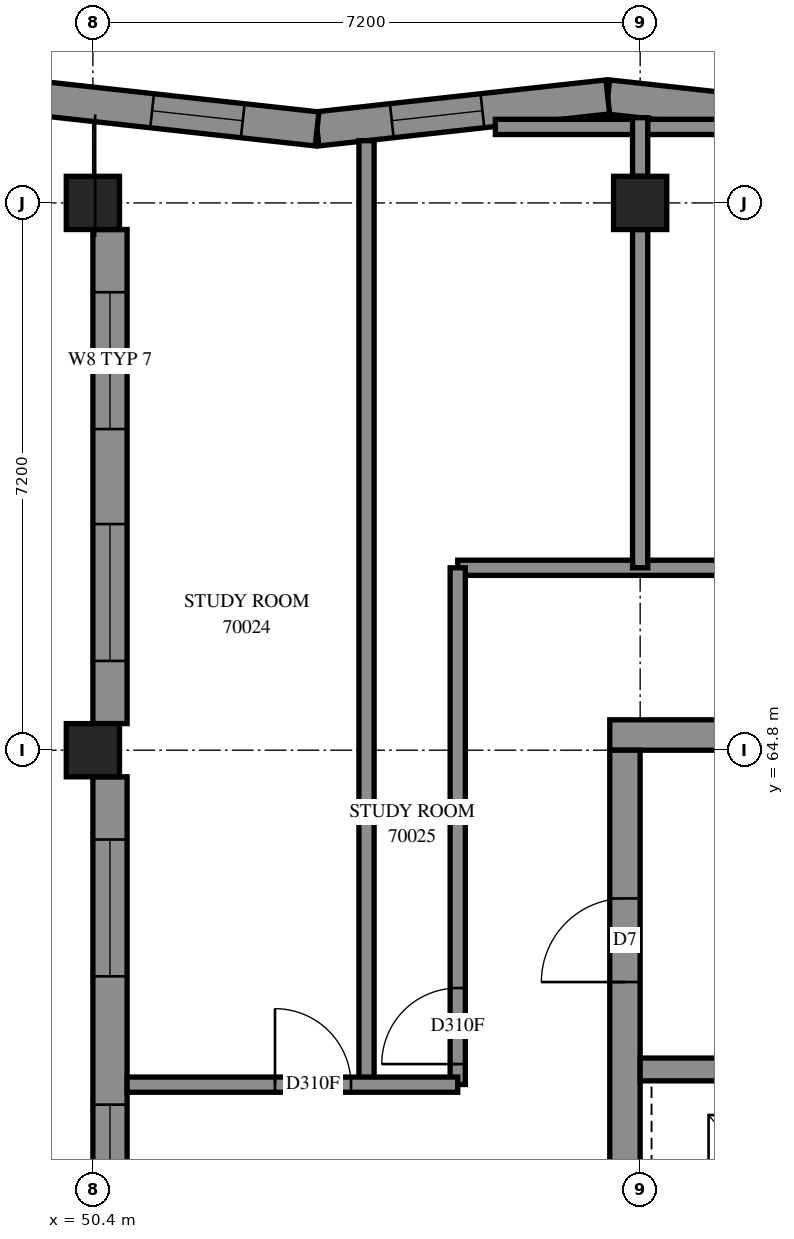
"""IFC4 building model, lengths in metres.
Left out: names, types, materials, properties, quantities, classifications, styles, units other than length and angle.
Written with IfcOpenShell. Run it as: python <this file> out.ifc"""

import sys

from ifc_helpers import new_model, si_unit, direction, frame, frame_2d, origin, origin_2d, place, context, subcontext, project, spatial, polyline, rectangle, outline, extrude, element, fill, save


model = new_model("IFC4")
c1 = context("Model", 3, precision=1e-05, world=origin(), true_north=direction((0.0, 1.0)))
c2 = subcontext(c1, "Body", "Model", "MODEL_VIEW")
j1 = project(units=[si_unit("LENGTHUNIT", "METRE"), si_unit("PLANEANGLEUNIT", "RADIAN")], contexts=[c1])
p1 = place(None, origin())
s1 = spatial("IfcSite", under=j1, at=p1, CompositionType="ELEMENT")
p2 = place(p1, origin())
s2 = spatial("IfcBuilding", under=s1, at=p2, CompositionType="ELEMENT")
p3 = place(p2, frame((0.0, 0.0, 257.4)))
s3 = spatial("IfcBuildingStorey", under=s2, at=p3, CompositionType="ELEMENT", Elevation=257.4)
for number, where, z_axis, x_axis in (
    (1, (50.4, 64.8, 0.0), (0.0, 0.0, 1.0), (1.0, 0.0, 0.0)),
    (2, (50.4, 72.0, 0.0), (0.0, 0.0, 1.0), (1.0, 0.0, 0.0)),
    (3, (57.6, 72.0, 0.0), (0.0, 0.0, 1.0), (1.0, 0.0, 0.0)),
):
    element("IfcColumn", number, at=place(p3, frame(where, z_axis=z_axis, x_axis=x_axis)), inside=s3, PredefinedType="COLUMN", context=c2, shape_type="SweptSolid", body=[
        extrude(rectangle(XDim=0.7, YDim=0.7, at=origin_2d()), origin(), (0.0, 0.0, 1.0), 3.1),
    ])
p4 = place(p3, frame((57.2, 65.0, -0.3), z_axis=(0.0, 0.0, 1.0), x_axis=(1.0, 0.0, 0.0)))
e4 = element("IfcWall", 4, at=p4, inside=s3, PredefinedType="SHEAR", context=c2, shape_type="SweptSolid", body=[
    extrude(rectangle(XDim=15.2, YDim=0.4, at=frame_2d((7.6, 0.0))), origin(), (0.0, 0.0, 1.0), 2.7),
])
p5 = place(p4, frame((10.4, 0.0, 0.3)))
e5 = element("IfcOpeningElement", 5, at=p5, cuts=e4, PredefinedType="OPENING", context=c2, shape_type="SweptSolid", body=[
    extrude(rectangle(XDim=0.8, YDim=2.1, at=frame_2d((0.4, 1.05))), frame((0.0, 0.21, 0.0), z_axis=(0.0, -1.0, 0.0), x_axis=(1.0, 0.0, 0.0)), (0.0, 0.0, 1.0), 0.42),
])
p6 = place(p3, frame((57.4, 50.4, -0.3), z_axis=(0.0, 0.0, 1.0), x_axis=(0.0, 1.0, 0.0)))
e6 = element("IfcWall", 6, at=p6, inside=s3, PredefinedType="SHEAR", context=c2, shape_type="SweptSolid", body=[
    extrude(rectangle(XDim=14.4, YDim=0.4, at=frame_2d((7.2, 0.0))), origin(), (0.0, 0.0, 1.0), 2.7),
])
p7 = place(p6, frame((4.55, 0.0, 0.3)))
e7 = element("IfcOpeningElement", 7, at=p7, cuts=e6, PredefinedType="OPENING", context=c2, shape_type="SweptSolid", body=[
    extrude(rectangle(XDim=1.1, YDim=2.1, at=frame_2d((0.55, 1.05))), frame((0.0, 0.21, 0.0), z_axis=(0.0, -1.0, 0.0), x_axis=(1.0, 0.0, 0.0)), (0.0, 0.0, 1.0), 0.42),
])
p8 = place(p6, frame((11.35, 0.0, 0.3)))
e8 = element("IfcOpeningElement", 8, at=p8, cuts=e6, PredefinedType="OPENING", context=c2, shape_type="SweptSolid", body=[
    extrude(rectangle(XDim=1.1, YDim=2.1, at=frame_2d((0.55, 1.05))), frame((0.0, 0.21, 0.0), z_axis=(0.0, -1.0, 0.0), x_axis=(1.0, 0.0, 0.0)), (0.0, 0.0, 1.0), 0.42),
])
p9 = place(p3, frame((57.6, 60.6, 0.0), z_axis=(0.0, 0.0, 1.0), x_axis=(1.0, 0.0, 0.0)))
e9 = element("IfcWall", 9, at=p9, inside=s3, PredefinedType="SOLIDWALL", context=c2, shape_type="SweptSolid", body=[
    extrude(rectangle(XDim=7.2, YDim=0.3, at=frame_2d((3.6, 0.0))), origin(), (0.0, 0.0, 1.0), 3.1),
])
p10 = place(p3, frame((60.998, 72.974, 0.0), z_axis=(0.0, 0.0, 1.0), x_axis=(-0.993995115, 0.109424455, 0.0)))
e10 = element("IfcWall", 10, at=p10, inside=s3, PredefinedType="SOLIDWALL", context=c2, shape_type="SweptSolid", body=[
    extrude(outline(polyline([(0.025, -0.225), (3.872, -0.225), (3.823, 0.225), (-0.025, 0.225), (0.025, -0.225)])), origin(), (0.0, 0.0, 1.0), 3.1),
])
p11 = place(p10, frame((0.422, 0.0, 0.7)))
e11 = element("IfcOpeningElement", 11, at=p11, cuts=e10, PredefinedType="OPENING", context=c2, shape_type="SweptSolid", body=[
    extrude(rectangle(XDim=1.8, YDim=2.3, at=frame_2d((0.9, 1.15))), frame((0.0, 0.235, 0.0), z_axis=(0.0, -1.0, 0.0), x_axis=(1.0, 0.0, 0.0)), (0.0, 0.0, 1.0), 0.47),
])
p12 = place(p3, frame((57.174, 73.395, 0.0), z_axis=(0.0, 0.0, 1.0), x_axis=(-0.9939954262, -0.1094216281, 0.0)))
e12 = element("IfcWall", 12, at=p12, inside=s3, PredefinedType="SOLIDWALL", context=c2, shape_type="SweptSolid", body=[
    extrude(outline(polyline([(-0.025, -0.225), (3.823, -0.225), (3.872, 0.225), (0.025, 0.225), (-0.025, -0.225)])), origin(), (0.0, 0.0, 1.0), 3.1),
])
p13 = place(p12, frame((1.659, 0.0, 0.45)))
e13 = element("IfcOpeningElement", 13, at=p13, cuts=e12, PredefinedType="OPENING", context=c2, shape_type="SweptSolid", body=[
    extrude(rectangle(XDim=1.2, YDim=2.55, at=frame_2d((0.6, 1.275))), frame((0.0, 0.235, 0.0), z_axis=(0.0, -1.0, 0.0), x_axis=(1.0, 0.0, 0.0)), (0.0, 0.0, 1.0), 0.47),
])
p14 = place(p3, frame((53.349, 72.974, 0.0), z_axis=(0.0, 0.0, 1.0), x_axis=(-0.9939954262, 0.1094216281, 0.0)))
e14 = element("IfcWall", 14, at=p14, inside=s3, PredefinedType="SOLIDWALL", context=c2, shape_type="SweptSolid", body=[
    extrude(outline(polyline([(0.025, -0.225), (3.872, -0.225), (3.823, 0.225), (-0.025, 0.225), (0.025, -0.225)])), origin(), (0.0, 0.0, 1.0), 3.1),
])
p15 = place(p14, frame((0.984, 0.0, 0.45)))
e15 = element("IfcOpeningElement", 15, at=p15, cuts=e14, PredefinedType="OPENING", context=c2, shape_type="SweptSolid", body=[
    extrude(rectangle(XDim=1.2, YDim=2.55, at=frame_2d((0.6, 1.275))), frame((0.0, 0.235, 0.0), z_axis=(0.0, -1.0, 0.0), x_axis=(1.0, 0.0, 0.0)), (0.0, 0.0, 1.0), 0.47),
])
p16 = place(p3, frame((50.625, 71.65, 0.0), z_axis=(0.0, 0.0, 1.0), x_axis=(0.0, -1.0, 0.0)))
e16 = element("IfcWall", 16, at=p16, inside=s3, PredefinedType="SOLIDWALL", context=c2, shape_type="SweptSolid", body=[
    extrude(rectangle(XDim=6.5, YDim=0.45, at=frame_2d((3.25, 0.0))), origin(), (0.0, 0.0, 1.0), 3.1),
])
p17 = place(p16, frame((0.825, 0.0, 0.7)))
e17 = element("IfcOpeningElement", 17, at=p17, cuts=e16, PredefinedType="OPENING", context=c2, shape_type="SweptSolid", body=[
    extrude(rectangle(XDim=1.8, YDim=1.8, at=frame_2d((0.9, 0.9))), frame((0.0, 0.235, 0.0), z_axis=(0.0, -1.0, 0.0), x_axis=(1.0, 0.0, 0.0)), (0.0, 0.0, 1.0), 0.47),
])
p18 = place(p16, frame((3.875, 0.0, 0.7)))
e18 = element("IfcOpeningElement", 18, at=p18, cuts=e16, PredefinedType="OPENING", context=c2, shape_type="SweptSolid", body=[
    extrude(rectangle(XDim=1.8, YDim=1.8, at=frame_2d((0.9, 0.9))), frame((0.0, 0.235, 0.0), z_axis=(0.0, -1.0, 0.0), x_axis=(1.0, 0.0, 0.0)), (0.0, 0.0, 1.0), 0.47),
])
p19 = place(p3, frame((50.625, 64.45, 0.0), z_axis=(0.0, 0.0, 1.0), x_axis=(0.0, -1.0, 0.0)))
e19 = element("IfcWall", 19, at=p19, inside=s3, PredefinedType="SOLIDWALL", context=c2, shape_type="SweptSolid", body=[
    extrude(rectangle(XDim=6.5, YDim=0.45, at=frame_2d((3.25, 0.0))), origin(), (0.0, 0.0, 1.0), 3.1),
])
p20 = place(p19, frame((0.825, 0.0, 0.7)))
e20 = element("IfcOpeningElement", 20, at=p20, cuts=e19, PredefinedType="OPENING", context=c2, shape_type="SweptSolid", body=[
    extrude(rectangle(XDim=1.8, YDim=1.8, at=frame_2d((0.9, 0.9))), frame((0.0, 0.235, 0.0), z_axis=(0.0, -1.0, 0.0), x_axis=(1.0, 0.0, 0.0)), (0.0, 0.0, 1.0), 0.47),
])
p21 = place(p19, frame((4.312, 0.0, 0.6)))
e21 = element("IfcOpeningElement", 21, at=p21, cuts=e19, PredefinedType="OPENING", context=c2, shape_type="SweptSolid", body=[
    extrude(rectangle(XDim=1.2, YDim=1.9, at=frame_2d((0.6, 0.95))), frame((0.0, 0.235, 0.0), z_axis=(0.0, -1.0, 0.0), x_axis=(1.0, 0.0, 0.0)), (0.0, 0.0, 1.0), 0.47),
])
p22 = place(p3, frame((55.2, 67.2, 0.0), z_axis=(0.0, 0.0, 1.0), x_axis=(1.0, 0.0, 0.0)))
e22 = element("IfcWall", 22, at=p22, inside=s3, PredefinedType="PARTITIONING", context=c2, shape_type="SweptSolid", body=[
    extrude(rectangle(XDim=19.2, YDim=0.2, at=frame_2d((9.6, 0.0))), origin(), (0.0, 0.0, 1.0), 3.1),
])
p23 = place(p22, frame((4.475, 0.0, 0.0)))
e23 = element("IfcOpeningElement", 23, at=p23, cuts=e22, PredefinedType="OPENING", context=c2, shape_type="SweptSolid", body=[
    extrude(rectangle(XDim=1.0, YDim=2.1, at=frame_2d((0.5, 1.05))), frame((0.0, 0.11, 0.0), z_axis=(0.0, -1.0, 0.0), x_axis=(1.0, 0.0, 0.0)), (0.0, 0.0, 1.0), 0.22),
])
p24 = place(p22, frame((8.301, 0.0, 0.0)))
e24 = element("IfcOpeningElement", 24, at=p24, cuts=e22, PredefinedType="OPENING", context=c2, shape_type="SweptSolid", body=[
    extrude(rectangle(XDim=0.9, YDim=2.1, at=frame_2d((0.45, 1.05))), frame((0.0, 0.11, 0.0), z_axis=(0.0, -1.0, 0.0), x_axis=(1.0, 0.0, 0.0)), (0.0, 0.0, 1.0), 0.22),
])
p25 = place(p22, frame((13.88, 0.0, 0.0)))
e25 = element("IfcOpeningElement", 25, at=p25, cuts=e22, PredefinedType="OPENING", context=c2, shape_type="SweptSolid", body=[
    extrude(rectangle(XDim=1.0, YDim=2.1, at=frame_2d((0.5, 1.05))), frame((0.0, 0.11, 0.0), z_axis=(0.0, -1.0, 0.0), x_axis=(1.0, 0.0, 0.0)), (0.0, 0.0, 1.0), 0.22),
])
p26 = place(p3, frame((54.0, 60.4, 0.0), z_axis=(0.0, 0.0, 1.0), x_axis=(0.0, 1.0, 0.0)))
e26 = element("IfcWall", 26, at=p26, inside=s3, PredefinedType="PARTITIONING", context=c2, shape_type="SweptSolid", body=[
    extrude(rectangle(XDim=12.419, YDim=0.2, at=frame_2d((6.21, 0.0))), origin(), (0.0, 0.0, 1.0), 3.1),
])
p27 = place(p3, frame((55.2, 60.402, 0.0), z_axis=(0.0, 0.0, 1.0), x_axis=(0.0, 1.0, 0.0)))
e27 = element("IfcWall", 27, at=p27, inside=s3, PredefinedType="PARTITIONING", context=c2, shape_type="SweptSolid", body=[
    extrude(rectangle(XDim=6.798, YDim=0.2, at=frame_2d((3.399, 0.0))), origin(), (0.0, 0.0, 1.0), 3.1),
])
p28 = place(p27, frame((0.269, 0.0, 0.0)))
e28 = element("IfcOpeningElement", 28, at=p28, cuts=e27, PredefinedType="OPENING", context=c2, shape_type="SweptSolid", body=[
    extrude(rectangle(XDim=1.0, YDim=2.1, at=frame_2d((0.5, 1.05))), frame((0.0, 0.11, 0.0), z_axis=(0.0, -1.0, 0.0), x_axis=(1.0, 0.0, 0.0)), (0.0, 0.0, 1.0), 0.22),
])
p29 = place(p3, frame((57.6, 67.2, 0.0), z_axis=(0.0, 0.0, 1.0), x_axis=(0.0, 1.0, 0.0)))
e29 = element("IfcWall", 29, at=p29, inside=s3, PredefinedType="PARTITIONING", context=c2, shape_type="SweptSolid", body=[
    extrude(rectangle(XDim=4.45, YDim=0.2, at=frame_2d((2.225, 0.0))), origin(), (0.0, 0.0, 1.0), 3.1),
])
p30 = place(p3, frame((50.85, 60.4, 0.0), z_axis=(0.0, 0.0, 1.0), x_axis=(1.0, 0.0, 0.0)))
e30 = element("IfcWall", 30, at=p30, inside=s3, PredefinedType="PARTITIONING", context=c2, shape_type="SweptSolid", body=[
    extrude(rectangle(XDim=4.35, YDim=0.2, at=frame_2d((2.175, 0.0))), origin(), (0.0, 0.0, 1.0), 3.1),
])
p31 = place(p30, frame((1.946, 0.0, 0.0)))
e31 = element("IfcOpeningElement", 31, at=p31, cuts=e30, PredefinedType="OPENING", context=c2, shape_type="SweptSolid", body=[
    extrude(rectangle(XDim=1.0, YDim=2.1, at=frame_2d((0.5, 1.05))), frame((0.0, 0.11, 0.0), z_axis=(0.0, -1.0, 0.0), x_axis=(1.0, 0.0, 0.0)), (0.0, 0.0, 1.0), 0.22),
])
p32 = place(p3, frame((55.695, 73.0, 0.0), z_axis=(0.0, 0.0, 1.0), x_axis=(1.0, 0.0, 0.0)))
e32 = element("IfcWall", 32, at=p32, inside=s3, PredefinedType="PARTITIONING", context=c2, shape_type="SweptSolid", body=[
    extrude(rectangle(XDim=2.957, YDim=0.2, at=frame_2d((1.479, 0.0))), origin(), (0.0, 0.0, 1.0), 3.1),
])
p33 = place(p3, frame((57.6, 72.35, 0.0), z_axis=(0.0, 0.0, 1.0), x_axis=(0.0, 1.0, 0.0)))
e33 = element("IfcWall", 33, at=p33, inside=s3, PredefinedType="PARTITIONING", context=c2, shape_type="SweptSolid", body=[
    extrude(rectangle(XDim=0.771, YDim=0.2, at=frame_2d((0.386, 0.0))), origin(), (0.0, 0.0, 1.0), 3.1),
])
p34 = place(p13, origin())
e34 = element("IfcWindow", 34, at=p34, inside=s3, PartitioningType="SINGLE_PANEL", PredefinedType="WINDOW", context=c2, shape_type="SweptSolid", body=[
    extrude(rectangle(XDim=1.2, YDim=2.55, at=frame_2d((0.6, 1.275))), frame((0.0, 0.205, 0.0), z_axis=(0.0, -1.0, 0.0), x_axis=(1.0, 0.0, 0.0)), (0.0, 0.0, 1.0), 0.06),
])
fill(e13, e34)
p35 = place(p15, origin())
e35 = element("IfcWindow", 35, at=p35, inside=s3, PartitioningType="SINGLE_PANEL", PredefinedType="WINDOW", context=c2, shape_type="SweptSolid", body=[
    extrude(rectangle(XDim=1.2, YDim=2.55, at=frame_2d((0.6, 1.275))), frame((0.0, 0.205, 0.0), z_axis=(0.0, -1.0, 0.0), x_axis=(1.0, 0.0, 0.0)), (0.0, 0.0, 1.0), 0.06),
])
fill(e15, e35)
p36 = place(p17, origin())
e36 = element("IfcWindow", 36, at=p36, inside=s3, PartitioningType="SINGLE_PANEL", PredefinedType="WINDOW", context=c2, shape_type="SweptSolid", body=[
    extrude(rectangle(XDim=1.8, YDim=1.8, at=frame_2d((0.9, 0.9))), frame((0.0, 0.205, 0.0), z_axis=(0.0, -1.0, 0.0), x_axis=(1.0, 0.0, 0.0)), (0.0, 0.0, 1.0), 0.06),
])
fill(e17, e36)
p37 = place(p18, origin())
e37 = element("IfcWindow", 37, at=p37, inside=s3, PartitioningType="SINGLE_PANEL", PredefinedType="WINDOW", context=c2, shape_type="SweptSolid", body=[
    extrude(rectangle(XDim=1.8, YDim=1.8, at=frame_2d((0.9, 0.9))), frame((0.0, 0.205, 0.0), z_axis=(0.0, -1.0, 0.0), x_axis=(1.0, 0.0, 0.0)), (0.0, 0.0, 1.0), 0.06),
])
fill(e18, e37)
p38 = place(p20, origin())
e38 = element("IfcWindow", 38, at=p38, inside=s3, PartitioningType="SINGLE_PANEL", PredefinedType="WINDOW", context=c2, shape_type="SweptSolid", body=[
    extrude(rectangle(XDim=1.8, YDim=1.8, at=frame_2d((0.9, 0.9))), frame((0.0, 0.205, 0.0), z_axis=(0.0, -1.0, 0.0), x_axis=(1.0, 0.0, 0.0)), (0.0, 0.0, 1.0), 0.06),
])
fill(e20, e38)
p39 = place(p8, origin())
e39 = element("IfcDoor", 39, at=p39, inside=s3, OperationType="SINGLE_SWING_LEFT", PredefinedType="DOOR", context=c2, shape_type="SweptSolid", body=[
    extrude(rectangle(XDim=1.1, YDim=2.1, at=frame_2d((0.55, 1.05))), frame((0.0, 0.025, 0.0), z_axis=(0.0, -1.0, 0.0), x_axis=(1.0, 0.0, 0.0)), (0.0, 0.0, 1.0), 0.05),
])
fill(e8, e39)
p40 = place(p31, origin())
e40 = element("IfcDoor", 40, at=p40, inside=s3, OperationType="SINGLE_SWING_RIGHT", PredefinedType="DOOR", context=c2, shape_type="SweptSolid", body=[
    extrude(rectangle(XDim=1.0, YDim=2.1, at=frame_2d((0.5, 1.05))), frame((0.0, 0.025, 0.0), z_axis=(0.0, -1.0, 0.0), x_axis=(1.0, 0.0, 0.0)), (0.0, 0.0, 1.0), 0.05),
])
fill(e31, e40)
p41 = place(p28, origin())
e41 = element("IfcDoor", 41, at=p41, inside=s3, OperationType="SINGLE_SWING_LEFT", PredefinedType="DOOR", context=c2, shape_type="SweptSolid", body=[
    extrude(rectangle(XDim=1.0, YDim=2.1, at=frame_2d((0.5, 1.05))), frame((0.0, 0.025, 0.0), z_axis=(0.0, -1.0, 0.0), x_axis=(1.0, 0.0, 0.0)), (0.0, 0.0, 1.0), 0.05),
])
fill(e28, e41)
p42 = place(p21, origin())
e42 = element("IfcWindow", 42, at=p42, inside=s3, PartitioningType="SINGLE_PANEL", PredefinedType="WINDOW", context=c2, shape_type="SweptSolid", body=[
    extrude(rectangle(XDim=1.2, YDim=1.9, at=frame_2d((0.6, 0.95))), frame((0.0, 0.205, 0.0), z_axis=(0.0, -1.0, 0.0), x_axis=(1.0, 0.0, 0.0)), (0.0, 0.0, 1.0), 0.06),
])
fill(e21, e42)
save(model, sys.argv[1])
